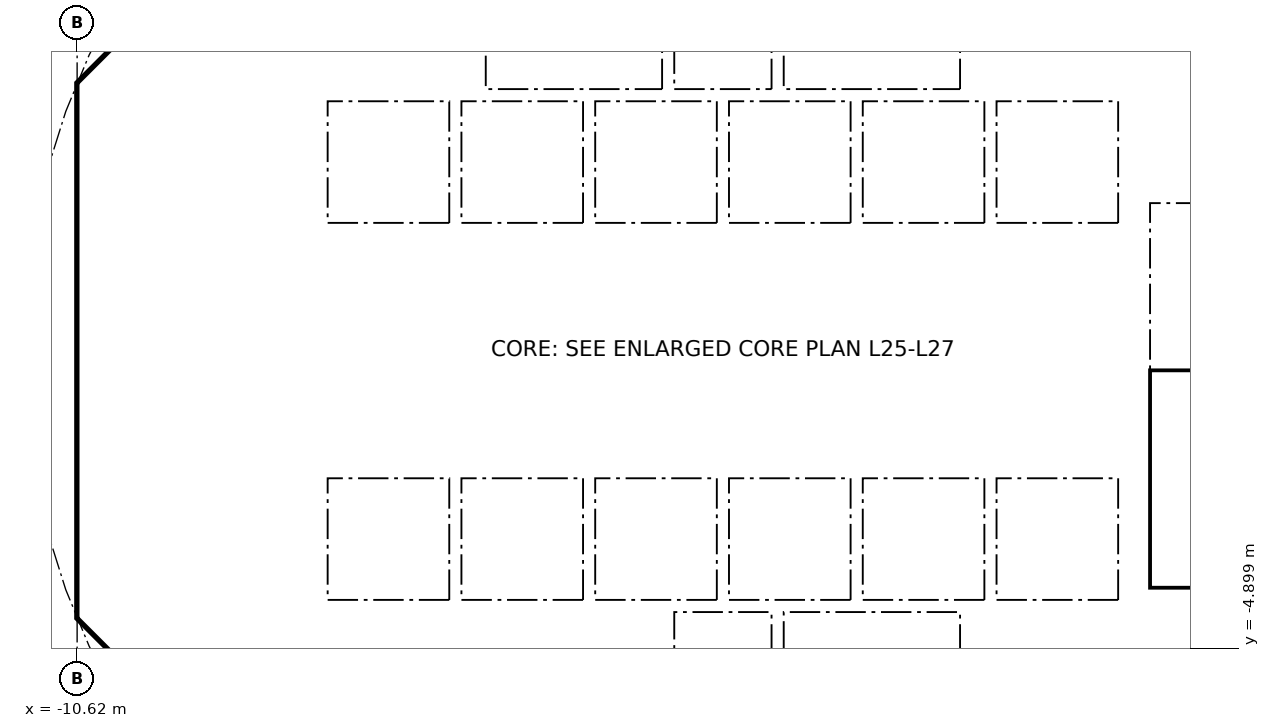
"""IFC4 building model, lengths in metres.
Left out: names, types, materials, properties, quantities, classifications, styles, units other than length and angle.
Written with IfcOpenShell. Run it as: python <this file> out.ifc"""

import sys

from ifc_helpers import new_model, si_unit, direction, frame, frame_2d, origin, place, context, subcontext, project, spatial, polyline, rectangle, outline, extrude, element, fill, save


model = new_model("IFC4")
c1 = context("Model", 3, precision=1e-05, world=origin(), true_north=direction((0.0, 1.0)))
c2 = subcontext(c1, "Body", "Model", "MODEL_VIEW")
j1 = project(units=[si_unit("LENGTHUNIT", "METRE"), si_unit("PLANEANGLEUNIT", "RADIAN")], contexts=[c1])
p1 = place(None, origin())
s1 = spatial("IfcSite", under=j1, at=p1, CompositionType="ELEMENT")
p2 = place(p1, origin())
s2 = spatial("IfcBuilding", under=s1, at=p2, CompositionType="ELEMENT")
p3 = place(p2, frame((0.0, 0.0, 106.6)))
s3 = spatial("IfcBuildingStorey", under=s2, at=p3, CompositionType="ELEMENT", Elevation=106.6)
p4 = place(p3, frame((9.988, 4.613, 0.0), z_axis=(0.0, 0.0, 1.0), x_axis=(-0.707106781187, 0.707106781187, 0.0)))
e1 = element("IfcWall", 1, at=p4, inside=s3, PredefinedType="SHEAR", context=c2, shape_type="SweptSolid", body=[
    extrude(rectangle(XDim=7.602, YDim=0.6, at=frame_2d((3.801, 0.0))), origin(), (0.0, 0.0, 1.0), 3.44),
])
p5 = place(p4, frame((3.201, 0.0, 0.0)))
e2 = element("IfcOpeningElement", 2, at=p5, cuts=e1, PredefinedType="OPENING", context=c2, shape_type="SweptSolid", body=[
    extrude(rectangle(XDim=1.2, YDim=2.1, at=frame_2d((0.6, 1.05))), frame((0.0, 0.31, 0.0), z_axis=(0.0, -1.0, 0.0), x_axis=(1.0, 0.0, 0.0)), (0.0, 0.0, 1.0), 0.62),
])
p6 = place(p3, frame((-4.613, 9.988, 0.0), z_axis=(0.0, 0.0, 1.0), x_axis=(-0.707106781187, -0.707106781187, 0.0)))
e3 = element("IfcWall", 3, at=p6, inside=s3, PredefinedType="SHEAR", context=c2, shape_type="SweptSolid", body=[
    extrude(rectangle(XDim=7.602, YDim=0.6, at=frame_2d((3.801, 0.0))), origin(), (0.0, 0.0, 1.0), 3.44),
])
p7 = place(p6, frame((0.351, 0.0, 0.0)))
e4 = element("IfcOpeningElement", 4, at=p7, cuts=e3, PredefinedType="OPENING", context=c2, shape_type="SweptSolid", body=[
    extrude(rectangle(XDim=1.1, YDim=2.1, at=frame_2d((0.55, 1.05))), frame((0.0, 0.31, 0.0), z_axis=(0.0, -1.0, 0.0), x_axis=(1.0, 0.0, 0.0)), (0.0, 0.0, 1.0), 0.62),
])
p8 = place(p3, frame((-10.325, 3.801, 0.0), z_axis=(0.0, 0.0, 1.0), x_axis=(0.0, -1.0, 0.0)))
e5 = element("IfcWall", 5, at=p8, inside=s3, PredefinedType="SHEAR", context=c2, shape_type="SweptSolid", body=[
    extrude(rectangle(XDim=7.602, YDim=0.6, at=frame_2d((3.801, 0.0))), origin(), (0.0, 0.0, 1.0), 3.44),
])
p9 = place(p8, frame((0.651, 0.0, 0.0)))
e6 = element("IfcOpeningElement", 6, at=p9, cuts=e5, PredefinedType="OPENING", context=c2, shape_type="SweptSolid", body=[
    extrude(rectangle(XDim=1.5, YDim=2.1, at=frame_2d((0.75, 1.05))), frame((0.0, 0.31, 0.0), z_axis=(0.0, -1.0, 0.0), x_axis=(1.0, 0.0, 0.0)), (0.0, 0.0, 1.0), 0.62),
])
p10 = place(p8, frame((5.451, 0.0, 0.0)))
e7 = element("IfcOpeningElement", 7, at=p10, cuts=e5, PredefinedType="OPENING", context=c2, shape_type="SweptSolid", body=[
    extrude(rectangle(XDim=1.5, YDim=2.1, at=frame_2d((0.75, 1.05))), frame((0.0, 0.31, 0.0), z_axis=(0.0, -1.0, 0.0), x_axis=(1.0, 0.0, 0.0)), (0.0, 0.0, 1.0), 0.62),
])
p11 = place(p3, frame((-9.988, -4.613, 0.0), z_axis=(0.0, 0.0, 1.0), x_axis=(0.707106781187, -0.707106781187, 0.0)))
e8 = element("IfcWall", 8, at=p11, inside=s3, PredefinedType="SHEAR", context=c2, shape_type="SweptSolid", body=[
    extrude(rectangle(XDim=7.602, YDim=0.6, at=frame_2d((3.801, 0.0))), origin(), (0.0, 0.0, 1.0), 3.44),
])
p12 = place(p11, frame((6.151, 0.0, 0.0)))
e9 = element("IfcOpeningElement", 9, at=p12, cuts=e8, PredefinedType="OPENING", context=c2, shape_type="SweptSolid", body=[
    extrude(rectangle(XDim=1.1, YDim=2.1, at=frame_2d((0.55, 1.05))), frame((0.0, 0.31, 0.0), z_axis=(0.0, -1.0, 0.0), x_axis=(1.0, 0.0, 0.0)), (0.0, 0.0, 1.0), 0.62),
])
p13 = place(p3, frame((4.613, -9.988, 0.0), z_axis=(0.0, 0.0, 1.0), x_axis=(0.707106781187, 0.707106781187, 0.0)))
e10 = element("IfcWall", 10, at=p13, inside=s3, PredefinedType="SHEAR", context=c2, shape_type="SweptSolid", body=[
    extrude(rectangle(XDim=7.602, YDim=0.6, at=frame_2d((3.801, 0.0))), origin(), (0.0, 0.0, 1.0), 3.44),
])
p14 = place(p13, frame((3.201, 0.0, 0.0)))
e11 = element("IfcOpeningElement", 11, at=p14, cuts=e10, PredefinedType="OPENING", context=c2, shape_type="SweptSolid", body=[
    extrude(rectangle(XDim=1.2, YDim=2.1, at=frame_2d((0.6, 1.05))), frame((0.0, 0.31, 0.0), z_axis=(0.0, -1.0, 0.0), x_axis=(1.0, 0.0, 0.0)), (0.0, 0.0, 1.0), 0.62),
])
p15 = place(p3, frame((-5.8, 4.3, 0.0), z_axis=(0.0, 0.0, 1.0), x_axis=(0.0, 1.0, 0.0)))
e12 = element("IfcWall", 12, at=p15, inside=s3, PredefinedType="PARTITIONING", context=c2, shape_type="SweptSolid", body=[
    extrude(rectangle(XDim=3.927, YDim=0.15, at=frame_2d((1.963, 0.0))), origin(), (0.0, 0.0, 1.0), 3.44),
])
p16 = place(p15, frame((0.413, 0.0, 0.0)))
e13 = element("IfcOpeningElement", 13, at=p16, cuts=e12, PredefinedType="OPENING", context=c2, shape_type="SweptSolid", body=[
    extrude(rectangle(XDim=0.9, YDim=2.1, at=frame_2d((0.45, 1.05))), frame((0.0, 0.085, 0.0), z_axis=(0.0, -1.0, 0.0), x_axis=(1.0, 0.0, 0.0)), (0.0, 0.0, 1.0), 0.17),
])
p17 = place(p15, frame((2.489, 0.0, 0.0)))
e14 = element("IfcOpeningElement", 14, at=p17, cuts=e12, PredefinedType="OPENING", context=c2, shape_type="SweptSolid", body=[
    extrude(rectangle(XDim=0.9, YDim=2.1, at=frame_2d((0.45, 1.05))), frame((0.0, 0.085, 0.0), z_axis=(0.0, -1.0, 0.0), x_axis=(1.0, 0.0, 0.0)), (0.0, 0.0, 1.0), 0.17),
])
p18 = place(p3, frame((4.0, 4.3, 0.0), z_axis=(0.0, 0.0, 1.0), x_axis=(0.0, 1.0, 0.0)))
e15 = element("IfcWall", 15, at=p18, inside=s3, PredefinedType="SOLIDWALL", context=c2, shape_type="SweptSolid", body=[
    extrude(rectangle(XDim=2.2, YDim=0.2, at=frame_2d((1.1, 0.0))), origin(), (0.0, 0.0, 1.0), 3.44),
])
p19 = place(p18, frame((0.55, 0.0, 0.0)))
e16 = element("IfcOpeningElement", 16, at=p19, cuts=e15, PredefinedType="OPENING", context=c2, shape_type="SweptSolid", body=[
    extrude(rectangle(XDim=1.1, YDim=2.1, at=frame_2d((0.55, 1.05))), frame((0.0, 0.11, 0.0), z_axis=(0.0, -1.0, 0.0), x_axis=(1.0, 0.0, 0.0)), (0.0, 0.0, 1.0), 0.22),
])
p20 = place(p3, frame((-4.0, 4.3, 0.0), z_axis=(0.0, 0.0, 1.0), x_axis=(0.0, 1.0, 0.0)))
e17 = element("IfcWall", 17, at=p20, inside=s3, PredefinedType="SOLIDWALL", context=c2, shape_type="SweptSolid", body=[
    extrude(rectangle(XDim=2.2, YDim=0.2, at=frame_2d((1.1, 0.0))), origin(), (0.0, 0.0, 1.0), 3.44),
])
p21 = place(p20, frame((0.55, 0.0, 0.0)))
e18 = element("IfcOpeningElement", 18, at=p21, cuts=e17, PredefinedType="OPENING", context=c2, shape_type="SweptSolid", body=[
    extrude(rectangle(XDim=1.1, YDim=2.1, at=frame_2d((0.55, 1.05))), frame((0.0, 0.11, 0.0), z_axis=(0.0, -1.0, 0.0), x_axis=(1.0, 0.0, 0.0)), (0.0, 0.0, 1.0), 0.22),
])
p22 = place(p3, frame((-6.7, 2.0, 0.0), z_axis=(0.0, 0.0, 1.0), x_axis=(1.0, 0.0, 0.0)))
e19 = element("IfcWall", 19, at=p22, inside=s3, PredefinedType="SOLIDWALL", context=c2, shape_type="SweptSolid", body=[
    extrude(rectangle(XDim=13.4, YDim=0.2, at=frame_2d((6.7, 0.0))), origin(), (0.0, 0.0, 1.0), 3.44),
])
p23 = place(p22, frame((0.65, 0.0, 0.0)))
e20 = element("IfcOpeningElement", 20, at=p23, cuts=e19, PredefinedType="OPENING", context=c2, shape_type="SweptSolid", body=[
    extrude(rectangle(XDim=1.1, YDim=2.1, at=frame_2d((0.55, 1.05))), frame((0.0, 0.11, 0.0), z_axis=(0.0, -1.0, 0.0), x_axis=(1.0, 0.0, 0.0)), (0.0, 0.0, 1.0), 0.22),
])
p24 = place(p22, frame((2.85, 0.0, 0.0)))
e21 = element("IfcOpeningElement", 21, at=p24, cuts=e19, PredefinedType="OPENING", context=c2, shape_type="SweptSolid", body=[
    extrude(rectangle(XDim=1.1, YDim=2.1, at=frame_2d((0.55, 1.05))), frame((0.0, 0.11, 0.0), z_axis=(0.0, -1.0, 0.0), x_axis=(1.0, 0.0, 0.0)), (0.0, 0.0, 1.0), 0.22),
])
p25 = place(p22, frame((5.05, 0.0, 0.0)))
e22 = element("IfcOpeningElement", 22, at=p25, cuts=e19, PredefinedType="OPENING", context=c2, shape_type="SweptSolid", body=[
    extrude(rectangle(XDim=1.1, YDim=2.1, at=frame_2d((0.55, 1.05))), frame((0.0, 0.11, 0.0), z_axis=(0.0, -1.0, 0.0), x_axis=(1.0, 0.0, 0.0)), (0.0, 0.0, 1.0), 0.22),
])
p26 = place(p3, frame((6.7, 4.0, 0.0), z_axis=(0.0, 0.0, 1.0), x_axis=(1.0, 0.0, 0.0)))
e23 = element("IfcWall", 23, at=p26, inside=s3, PredefinedType="SOLIDWALL", context=c2, shape_type="SweptSolid", body=[
    extrude(rectangle(XDim=3.325, YDim=0.2, at=frame_2d((1.662, 0.0))), origin(), (0.0, 0.0, 1.0), 3.44),
])
p27 = place(p26, frame((1.25, 0.0, 0.0)))
e24 = element("IfcOpeningElement", 24, at=p27, cuts=e23, PredefinedType="OPENING", context=c2, shape_type="SweptSolid", body=[
    extrude(rectangle(XDim=1.1, YDim=2.1, at=frame_2d((0.55, 1.05))), frame((0.0, 0.11, 0.0), z_axis=(0.0, -1.0, 0.0), x_axis=(1.0, 0.0, 0.0)), (0.0, 0.0, 1.0), 0.22),
])
p28 = place(p3, frame((-5.8, -8.227, 0.0), z_axis=(0.0, 0.0, 1.0), x_axis=(0.0, 1.0, 0.0)))
e25 = element("IfcWall", 25, at=p28, inside=s3, PredefinedType="PARTITIONING", context=c2, shape_type="SweptSolid", body=[
    extrude(rectangle(XDim=3.927, YDim=0.15, at=frame_2d((1.963, 0.0))), origin(), (0.0, 0.0, 1.0), 3.44),
])
p29 = place(p28, frame((2.615, 0.0, 0.0)))
e26 = element("IfcOpeningElement", 26, at=p29, cuts=e25, PredefinedType="OPENING", context=c2, shape_type="SweptSolid", body=[
    extrude(rectangle(XDim=0.9, YDim=2.1, at=frame_2d((0.45, 1.05))), frame((0.0, 0.085, 0.0), z_axis=(0.0, -1.0, 0.0), x_axis=(1.0, 0.0, 0.0)), (0.0, 0.0, 1.0), 0.17),
])
p30 = place(p28, frame((0.539, 0.0, 0.0)))
e27 = element("IfcOpeningElement", 27, at=p30, cuts=e25, PredefinedType="OPENING", context=c2, shape_type="SweptSolid", body=[
    extrude(rectangle(XDim=0.9, YDim=2.1, at=frame_2d((0.45, 1.05))), frame((0.0, 0.085, 0.0), z_axis=(0.0, -1.0, 0.0), x_axis=(1.0, 0.0, 0.0)), (0.0, 0.0, 1.0), 0.17),
])
p31 = place(p3, frame((4.0, -6.5, 0.0), z_axis=(0.0, 0.0, 1.0), x_axis=(0.0, 1.0, 0.0)))
e28 = element("IfcWall", 28, at=p31, inside=s3, PredefinedType="SOLIDWALL", context=c2, shape_type="SweptSolid", body=[
    extrude(rectangle(XDim=2.2, YDim=0.2, at=frame_2d((1.1, 0.0))), origin(), (0.0, 0.0, 1.0), 3.44),
])
p32 = place(p31, frame((0.55, 0.0, 0.0)))
e29 = element("IfcOpeningElement", 29, at=p32, cuts=e28, PredefinedType="OPENING", context=c2, shape_type="SweptSolid", body=[
    extrude(rectangle(XDim=1.1, YDim=2.1, at=frame_2d((0.55, 1.05))), frame((0.0, 0.11, 0.0), z_axis=(0.0, -1.0, 0.0), x_axis=(1.0, 0.0, 0.0)), (0.0, 0.0, 1.0), 0.22),
])
p33 = place(p3, frame((-4.0, -6.5, 0.0), z_axis=(0.0, 0.0, 1.0), x_axis=(0.0, 1.0, 0.0)))
e30 = element("IfcWall", 30, at=p33, inside=s3, PredefinedType="SOLIDWALL", context=c2, shape_type="SweptSolid", body=[
    extrude(rectangle(XDim=2.2, YDim=0.2, at=frame_2d((1.1, 0.0))), origin(), (0.0, 0.0, 1.0), 3.44),
])
p34 = place(p33, frame((0.65, 0.0, 0.0)))
e31 = element("IfcOpeningElement", 31, at=p34, cuts=e30, PredefinedType="OPENING", context=c2, shape_type="SweptSolid", body=[
    extrude(rectangle(XDim=0.9, YDim=2.1, at=frame_2d((0.45, 1.05))), frame((0.0, 0.11, 0.0), z_axis=(0.0, -1.0, 0.0), x_axis=(1.0, 0.0, 0.0)), (0.0, 0.0, 1.0), 0.22),
])
p35 = place(p3, frame((-6.7, -2.0, 0.0), z_axis=(0.0, 0.0, 1.0), x_axis=(1.0, 0.0, 0.0)))
e32 = element("IfcWall", 32, at=p35, inside=s3, PredefinedType="SOLIDWALL", context=c2, shape_type="SweptSolid", body=[
    extrude(rectangle(XDim=13.4, YDim=0.2, at=frame_2d((6.7, 0.0))), origin(), (0.0, 0.0, 1.0), 3.44),
])
p36 = place(p35, frame((0.65, 0.0, 0.0)))
e33 = element("IfcOpeningElement", 33, at=p36, cuts=e32, PredefinedType="OPENING", context=c2, shape_type="SweptSolid", body=[
    extrude(rectangle(XDim=1.1, YDim=2.1, at=frame_2d((0.55, 1.05))), frame((0.0, 0.11, 0.0), z_axis=(0.0, -1.0, 0.0), x_axis=(1.0, 0.0, 0.0)), (0.0, 0.0, 1.0), 0.22),
])
p37 = place(p35, frame((2.85, 0.0, 0.0)))
e34 = element("IfcOpeningElement", 34, at=p37, cuts=e32, PredefinedType="OPENING", context=c2, shape_type="SweptSolid", body=[
    extrude(rectangle(XDim=1.1, YDim=2.1, at=frame_2d((0.55, 1.05))), frame((0.0, 0.11, 0.0), z_axis=(0.0, -1.0, 0.0), x_axis=(1.0, 0.0, 0.0)), (0.0, 0.0, 1.0), 0.22),
])
p38 = place(p3, origin())
e35 = element("IfcWall", 35, at=p38, inside=s3, PredefinedType="SHEAR", context=c2, shape_type="SweptSolid", body=[
    extrude(outline(polyline([(-10.625, -3.801), (-10.025, -3.801), (-10.025, -4.152), (-9.776, -4.401), (-10.2, -4.825), (-10.625, -4.401), (-10.625, -3.801)])), origin(), (0.0, 0.0, 1.0), 3.44),
])
p39 = place(p3, origin())
e36 = element("IfcWall", 36, at=p39, inside=s3, PredefinedType="SHEAR", context=c2, shape_type="SweptSolid", body=[
    extrude(outline(polyline([(-10.2, 4.825), (-9.776, 4.401), (-10.025, 4.152), (-10.025, 3.801), (-10.625, 3.801), (-10.625, 4.401), (-10.2, 4.825)])), origin(), (0.0, 0.0, 1.0), 3.44),
])
for number, where, z_axis, x_axis in (
    (37, (-10.025, -4.0, 0.0), (0.0, 0.0, 1.0), (1.0, 0.0, 0.0)),
    (38, (-10.025, 4.0, 0.0), (0.0, 0.0, 1.0), (1.0, 0.0, 0.0)),
):
    element("IfcWall", number, at=place(p3, frame(where, z_axis=z_axis, x_axis=x_axis)), inside=s3, PredefinedType="PARTITIONING", context=c2, shape_type="SweptSolid", body=[
        extrude(rectangle(XDim=3.325, YDim=0.2, at=frame_2d((1.662, 0.0))), origin(), (0.0, 0.0, 1.0), 3.44),
    ])
for number, where, z_axis, x_axis in (
    (39, (-0.9, -6.5, 0.0), (0.0, 0.0, 1.0), (0.0, 1.0, 0.0)),
    (40, (0.9, -6.5, 0.0), (0.0, 0.0, 1.0), (0.0, 1.0, 0.0)),
):
    element("IfcWall", number, at=place(p3, frame(where, z_axis=z_axis, x_axis=x_axis)), inside=s3, PredefinedType="SOLIDWALL", context=c2, shape_type="SweptSolid", body=[
        extrude(rectangle(XDim=2.2, YDim=0.2, at=frame_2d((1.1, 0.0))), origin(), (0.0, 0.0, 1.0), 3.44),
    ])
p40 = place(p3, origin())
e41 = element("IfcWall", 41, at=p40, inside=s3, PredefinedType="SOLIDWALL", context=c2, shape_type="SweptSolid", body=[
    extrude(outline(polyline([(-6.7, -2.1), (-6.5, -2.1), (-6.5, -4.1), (-4.5, -4.1), (-4.5, -2.1), (-4.3, -2.1), (-4.3, -4.1), (-2.3, -4.1), (-2.3, -2.1), (-2.1, -2.1), (-2.1, -4.1), (-0.1, -4.1), (-0.1, -2.1), (0.1, -2.1), (0.1, -4.1), (2.1, -4.1), (2.1, -2.1), (2.3, -2.1), (2.3, -4.1), (4.3, -4.1), (4.3, -2.1), (4.5, -2.1), (4.5, -4.1), (6.5, -4.1), (6.5, -2.1), (6.7, -2.1), (6.7, -4.3), (-6.7, -4.3), (-6.7, -2.1)])), origin(), (0.0, 0.0, 1.0), 3.44),
])
for number, where, z_axis, x_axis in (
    (42, (-0.9, 4.3, 0.0), (0.0, 0.0, 1.0), (0.0, 1.0, 0.0)),
    (43, (0.9, 4.3, 0.0), (0.0, 0.0, 1.0), (0.0, 1.0, 0.0)),
):
    element("IfcWall", number, at=place(p3, frame(where, z_axis=z_axis, x_axis=x_axis)), inside=s3, PredefinedType="SOLIDWALL", context=c2, shape_type="SweptSolid", body=[
        extrude(rectangle(XDim=2.2, YDim=0.2, at=frame_2d((1.1, 0.0))), origin(), (0.0, 0.0, 1.0), 3.44),
    ])
p41 = place(p3, origin())
e44 = element("IfcWall", 44, at=p41, inside=s3, PredefinedType="SOLIDWALL", context=c2, shape_type="SweptSolid", body=[
    extrude(outline(polyline([(-6.5, 2.1), (-6.7, 2.1), (-6.7, 4.3), (6.7, 4.3), (6.7, 2.1), (6.5, 2.1), (6.5, 4.1), (4.5, 4.1), (4.5, 2.1), (4.3, 2.1), (4.3, 4.1), (2.3, 4.1), (2.3, 2.1), (2.1, 2.1), (2.1, 4.1), (0.1, 4.1), (0.1, 2.1), (-0.1, 2.1), (-0.1, 4.1), (-2.1, 4.1), (-2.1, 2.1), (-2.3, 2.1), (-2.3, 4.1), (-4.3, 4.1), (-4.3, 2.1), (-4.5, 2.1), (-4.5, 4.1), (-6.5, 4.1), (-6.5, 2.1)])), origin(), (0.0, 0.0, 1.0), 3.44),
])
p42 = place(p3, origin())
e45 = element("IfcWall", 45, at=p42, inside=s3, PredefinedType="SOLIDWALL", context=c2, shape_type="SweptSolid", body=[
    extrude(outline(polyline([(7.025, -3.9), (6.7, -3.9), (6.7, 3.9), (7.025, 3.9), (7.025, -3.9)])), origin(), (0.0, 0.0, 1.0), 3.44),
])
p43 = place(p3, origin())
e46 = element("IfcWall", 46, at=p43, inside=s3, PredefinedType="SOLIDWALL", context=c2, shape_type="SweptSolid", body=[
    extrude(outline(polyline([(10.025, -4.1), (6.7, -4.1), (6.7, -3.9), (10.025, -3.9), (10.025, -4.1)])), origin(), (0.0, 0.0, 1.0), 3.44),
])
p44 = place(p23, origin())
e47 = element("IfcDoor", 47, at=p44, inside=s3, OperationType="DOUBLE_DOOR_SLIDING", PredefinedType="DOOR", context=c2, shape_type="SweptSolid", body=[
    extrude(rectangle(XDim=1.1, YDim=2.1, at=frame_2d((0.55, 1.05))), frame((0.0, 0.025, 0.0), z_axis=(0.0, -1.0, 0.0), x_axis=(1.0, 0.0, 0.0)), (0.0, 0.0, 1.0), 0.05),
])
fill(e20, e47)
p45 = place(p24, origin())
e48 = element("IfcDoor", 48, at=p45, inside=s3, OperationType="DOUBLE_DOOR_SLIDING", PredefinedType="DOOR", context=c2, shape_type="SweptSolid", body=[
    extrude(rectangle(XDim=1.1, YDim=2.1, at=frame_2d((0.55, 1.05))), frame((0.0, 0.025, 0.0), z_axis=(0.0, -1.0, 0.0), x_axis=(1.0, 0.0, 0.0)), (0.0, 0.0, 1.0), 0.05),
])
fill(e21, e48)
p46 = place(p25, origin())
e49 = element("IfcDoor", 49, at=p46, inside=s3, OperationType="DOUBLE_DOOR_SLIDING", PredefinedType="DOOR", context=c2, shape_type="SweptSolid", body=[
    extrude(rectangle(XDim=1.1, YDim=2.1, at=frame_2d((0.55, 1.05))), frame((0.0, 0.025, 0.0), z_axis=(0.0, -1.0, 0.0), x_axis=(1.0, 0.0, 0.0)), (0.0, 0.0, 1.0), 0.05),
])
fill(e22, e49)
p47 = place(p36, origin())
e50 = element("IfcDoor", 50, at=p47, inside=s3, OperationType="DOUBLE_DOOR_SLIDING", PredefinedType="DOOR", context=c2, shape_type="SweptSolid", body=[
    extrude(rectangle(XDim=1.1, YDim=2.1, at=frame_2d((0.55, 1.05))), frame((0.0, 0.025, 0.0), z_axis=(0.0, -1.0, 0.0), x_axis=(1.0, 0.0, 0.0)), (0.0, 0.0, 1.0), 0.05),
])
fill(e33, e50)
p48 = place(p37, origin())
e51 = element("IfcDoor", 51, at=p48, inside=s3, OperationType="DOUBLE_DOOR_SLIDING", PredefinedType="DOOR", context=c2, shape_type="SweptSolid", body=[
    extrude(rectangle(XDim=1.1, YDim=2.1, at=frame_2d((0.55, 1.05))), frame((0.0, 0.025, 0.0), z_axis=(0.0, -1.0, 0.0), x_axis=(1.0, 0.0, 0.0)), (0.0, 0.0, 1.0), 0.05),
])
fill(e34, e51)
p49 = place(p19, origin())
e52 = element("IfcDoor", 52, at=p49, inside=s3, OperationType="DOUBLE_DOOR_SLIDING", PredefinedType="DOOR", context=c2, shape_type="SweptSolid", body=[
    extrude(rectangle(XDim=1.1, YDim=2.1, at=frame_2d((0.55, 1.05))), frame((0.0, 0.025, 0.0), z_axis=(0.0, -1.0, 0.0), x_axis=(1.0, 0.0, 0.0)), (0.0, 0.0, 1.0), 0.05),
])
fill(e16, e52)
p50 = place(p32, origin())
e53 = element("IfcDoor", 53, at=p50, inside=s3, OperationType="DOUBLE_DOOR_SLIDING", PredefinedType="DOOR", context=c2, shape_type="SweptSolid", body=[
    extrude(rectangle(XDim=1.1, YDim=2.1, at=frame_2d((0.55, 1.05))), frame((0.0, 0.025, 0.0), z_axis=(0.0, -1.0, 0.0), x_axis=(1.0, 0.0, 0.0)), (0.0, 0.0, 1.0), 0.05),
])
fill(e29, e53)
p51 = place(p21, origin())
e54 = element("IfcDoor", 54, at=p51, inside=s3, OperationType="DOUBLE_DOOR_SLIDING", PredefinedType="DOOR", context=c2, shape_type="SweptSolid", body=[
    extrude(rectangle(XDim=1.1, YDim=2.1, at=frame_2d((0.55, 1.05))), frame((0.0, 0.025, 0.0), z_axis=(0.0, -1.0, 0.0), x_axis=(1.0, 0.0, 0.0)), (0.0, 0.0, 1.0), 0.05),
])
fill(e18, e54)
p52 = place(p16, origin())
e55 = element("IfcDoor", 55, at=p52, inside=s3, OperationType="SINGLE_SWING_RIGHT", PredefinedType="DOOR", context=c2, shape_type="SweptSolid", body=[
    extrude(rectangle(XDim=0.9, YDim=2.1, at=frame_2d((0.45, 1.05))), frame((0.0, 0.025, 0.0), z_axis=(0.0, -1.0, 0.0), x_axis=(1.0, 0.0, 0.0)), (0.0, 0.0, 1.0), 0.05),
])
fill(e13, e55)
p53 = place(p29, origin())
e56 = element("IfcDoor", 56, at=p53, inside=s3, OperationType="SINGLE_SWING_RIGHT", PredefinedType="DOOR", context=c2, shape_type="SweptSolid", body=[
    extrude(rectangle(XDim=0.9, YDim=2.1, at=frame_2d((0.45, 1.05))), frame((0.0, 0.025, 0.0), z_axis=(0.0, -1.0, 0.0), x_axis=(1.0, 0.0, 0.0)), (0.0, 0.0, 1.0), 0.05),
])
fill(e26, e56)
p54 = place(p9, origin())
e57 = element("IfcDoor", 57, at=p54, inside=s3, OperationType="DOUBLE_DOOR_SINGLE_SWING", PredefinedType="DOOR", context=c2, shape_type="SweptSolid", body=[
    extrude(rectangle(XDim=1.5, YDim=2.1, at=frame_2d((0.75, 1.05))), frame((0.0, 0.025, 0.0), z_axis=(0.0, -1.0, 0.0), x_axis=(1.0, 0.0, 0.0)), (0.0, 0.0, 1.0), 0.05),
])
fill(e6, e57)
p55 = place(p10, origin())
e58 = element("IfcDoor", 58, at=p55, inside=s3, OperationType="DOUBLE_DOOR_SINGLE_SWING", PredefinedType="DOOR", context=c2, shape_type="SweptSolid", body=[
    extrude(rectangle(XDim=1.5, YDim=2.1, at=frame_2d((0.75, 1.05))), frame((0.0, 0.025, 0.0), z_axis=(0.0, -1.0, 0.0), x_axis=(1.0, 0.0, 0.0)), (0.0, 0.0, 1.0), 0.05),
])
fill(e7, e58)
save(model, sys.argv[1])
